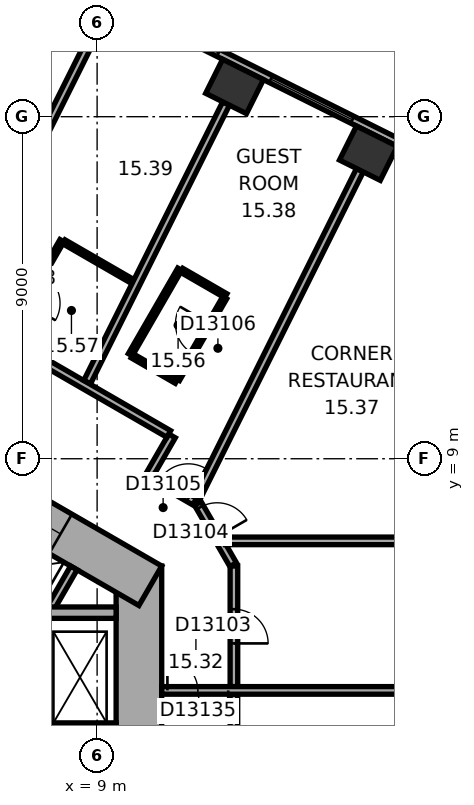
"""IFC4 building model, lengths in metres.
Left out: names, types, materials, properties, quantities, classifications, styles, units other than length and angle.
Written with IfcOpenShell. Run it as: python <this file> out.ifc"""

import sys

from ifc_helpers import new_model, si_unit, direction, frame, frame_2d, origin, origin_2d, place, context, subcontext, project, spatial, rectangle, extrude, element, fill, save


model = new_model("IFC4")
c1 = context("Model", 3, precision=1e-05, world=origin(), true_north=direction((0.0, 1.0)))
c2 = subcontext(c1, "Body", "Model", "MODEL_VIEW")
j1 = project(units=[si_unit("LENGTHUNIT", "METRE"), si_unit("PLANEANGLEUNIT", "RADIAN")], contexts=[c1])
p1 = place(None, origin())
s1 = spatial("IfcSite", under=j1, at=p1, CompositionType="ELEMENT")
p2 = place(p1, origin())
s2 = spatial("IfcBuilding", under=s1, at=p2, CompositionType="ELEMENT")
p3 = place(p2, frame((0.0, 0.0, 70.4)))
s3 = spatial("IfcBuildingStorey", under=s2, at=p3, CompositionType="ELEMENT", Elevation=70.4)
for number, where, z_axis, x_axis in (
    (1, (16.138, 17.04, 0.0), (0.0, 0.0, 1.0), (-0.895, 0.446, 0.0)),
    (2, (12.616, 18.795, 0.0), (0.0, 0.0, 1.0), (-0.895, 0.446, 0.0)),
):
    element("IfcColumn", number, at=place(p3, frame(where, z_axis=z_axis, x_axis=x_axis)), inside=s3, PredefinedType="COLUMN", context=c2, shape_type="SweptSolid", body=[
        extrude(rectangle(XDim=1.2, YDim=1.0, at=origin_2d()), origin(), (0.0, 0.0, 1.0), 3.3),
    ])
p4 = place(p3, frame((10.1, -6.177, 0.0), z_axis=(0.0, 0.0, 1.0), x_axis=(0.0, 1.0, 0.0)))
e3 = element("IfcWall", 3, at=p4, inside=s3, PredefinedType="SHEAR", context=c2, shape_type="SweptSolid", body=[
    extrude(rectangle(XDim=12.355, YDim=1.2, at=frame_2d((6.177, 0.0))), origin(), (0.0, 0.0, 1.0), 3.3),
])
p5 = place(p4, frame((6.378, 0.0, 0.0)))
e4 = element("IfcOpeningElement", 4, at=p5, cuts=e3, PredefinedType="OPENING", context=c2, shape_type="SweptSolid", body=[
    extrude(rectangle(XDim=1.5, YDim=2.1, at=frame_2d((0.75, 1.05))), frame((0.0, 0.61, 0.0), z_axis=(0.0, -1.0, 0.0), x_axis=(1.0, 0.0, 0.0)), (0.0, 0.0, 1.0), 1.22),
])
p6 = place(p4, frame((1.828, 0.0, 0.0)))
e5 = element("IfcOpeningElement", 5, at=p6, cuts=e3, PredefinedType="OPENING", context=c2, shape_type="SweptSolid", body=[
    extrude(rectangle(XDim=1.1, YDim=2.1, at=frame_2d((0.55, 1.05))), frame((0.0, 0.61, 0.0), z_axis=(0.0, -1.0, 0.0), x_axis=(1.0, 0.0, 0.0)), (0.0, 0.0, 1.0), 1.22),
])
p7 = place(p4, frame((4.427, 0.0, 0.0)))
e6 = element("IfcOpeningElement", 6, at=p7, cuts=e3, PredefinedType="OPENING", context=c2, shape_type="SweptSolid", body=[
    extrude(rectangle(XDim=1.1, YDim=2.1, at=frame_2d((0.55, 1.05))), frame((0.0, 0.61, 0.0), z_axis=(0.0, -1.0, 0.0), x_axis=(1.0, 0.0, 0.0)), (0.0, 0.0, 1.0), 1.22),
])
p8 = place(p3, frame((10.4, 5.658, 0.0), z_axis=(0.0, 0.0, 1.0), x_axis=(-0.866021384402, 0.500006961711, 0.0)))
e7 = element("IfcWall", 7, at=p8, inside=s3, PredefinedType="SHEAR", context=c2, shape_type="SweptSolid", body=[
    extrude(rectangle(XDim=12.355, YDim=1.2, at=frame_2d((6.178, 0.0))), origin(), (0.0, 0.0, 1.0), 3.3),
])
p9 = place(p8, frame((2.728, 0.0, 0.0)))
e8 = element("IfcOpeningElement", 8, at=p9, cuts=e7, PredefinedType="OPENING", context=c2, shape_type="SweptSolid", body=[
    extrude(rectangle(XDim=1.1, YDim=2.1, at=frame_2d((0.55, 1.05))), frame((0.0, 0.61, 0.0), z_axis=(0.0, -1.0, 0.0), x_axis=(1.0, 0.0, 0.0)), (0.0, 0.0, 1.0), 1.22),
])
p10 = place(p8, frame((5.328, 0.0, 0.0)))
e9 = element("IfcOpeningElement", 9, at=p10, cuts=e7, PredefinedType="OPENING", context=c2, shape_type="SweptSolid", body=[
    extrude(rectangle(XDim=1.1, YDim=2.1, at=frame_2d((0.55, 1.05))), frame((0.0, 0.61, 0.0), z_axis=(0.0, -1.0, 0.0), x_axis=(1.0, 0.0, 0.0)), (0.0, 0.0, 1.0), 1.22),
])
p11 = place(p8, frame((7.928, 0.0, 0.0)))
e10 = element("IfcOpeningElement", 10, at=p11, cuts=e7, PredefinedType="OPENING", context=c2, shape_type="SweptSolid", body=[
    extrude(rectangle(XDim=1.1, YDim=2.1, at=frame_2d((0.55, 1.05))), frame((0.0, 0.61, 0.0), z_axis=(0.0, -1.0, 0.0), x_axis=(1.0, 0.0, 0.0)), (0.0, 0.0, 1.0), 1.22),
])
p12 = place(p3, frame((20.63, 15.47, 0.0), z_axis=(0.0, 0.0, 1.0), x_axis=(-0.894934518609, 0.446197498203, 0.0)))
e11 = element("IfcWall", 11, at=p12, inside=s3, PredefinedType="STANDARD", context=c2, shape_type="SweptSolid", body=[
    extrude(rectangle(XDim=21.246, YDim=0.2, at=frame_2d((10.623, 0.0))), origin(), (0.0, 0.0, 1.0), 3.3),
])
p13 = place(p12, frame((1.553, 0.0, 0.8)))
e12 = element("IfcOpeningElement", 12, at=p13, cuts=e11, PredefinedType="OPENING", context=c2, shape_type="SweptSolid", body=[
    extrude(rectangle(XDim=2.4, YDim=1.7, at=frame_2d((1.2, 0.85))), frame((0.0, 0.11, 0.0), z_axis=(0.0, -1.0, 0.0), x_axis=(1.0, 0.0, 0.0)), (0.0, 0.0, 1.0), 0.22),
])
p14 = place(p12, frame((5.488, 0.0, 0.8)))
e13 = element("IfcOpeningElement", 13, at=p14, cuts=e11, PredefinedType="OPENING", context=c2, shape_type="SweptSolid", body=[
    extrude(rectangle(XDim=2.4, YDim=1.7, at=frame_2d((1.2, 0.85))), frame((0.0, 0.11, 0.0), z_axis=(0.0, -1.0, 0.0), x_axis=(1.0, 0.0, 0.0)), (0.0, 0.0, 1.0), 0.22),
])
p15 = place(p12, frame((9.422, 0.0, 0.8)))
e14 = element("IfcOpeningElement", 14, at=p15, cuts=e11, PredefinedType="OPENING", context=c2, shape_type="SweptSolid", body=[
    extrude(rectangle(XDim=2.4, YDim=1.7, at=frame_2d((1.2, 0.85))), frame((0.0, 0.11, 0.0), z_axis=(0.0, -1.0, 0.0), x_axis=(1.0, 0.0, 0.0)), (0.0, 0.0, 1.0), 0.22),
])
p16 = place(p12, frame((13.357, 0.0, 0.8)))
e15 = element("IfcOpeningElement", 15, at=p16, cuts=e11, PredefinedType="OPENING", context=c2, shape_type="SweptSolid", body=[
    extrude(rectangle(XDim=2.4, YDim=1.7, at=frame_2d((1.2, 0.85))), frame((0.0, 0.11, 0.0), z_axis=(0.0, -1.0, 0.0), x_axis=(1.0, 0.0, 0.0)), (0.0, 0.0, 1.0), 0.22),
])
p17 = place(p12, frame((17.292, 0.0, 0.8)))
e16 = element("IfcOpeningElement", 16, at=p17, cuts=e11, PredefinedType="OPENING", context=c2, shape_type="SweptSolid", body=[
    extrude(rectangle(XDim=2.4, YDim=1.7, at=frame_2d((1.2, 0.85))), frame((0.0, 0.11, 0.0), z_axis=(0.0, -1.0, 0.0), x_axis=(1.0, 0.0, 0.0)), (0.0, 0.0, 1.0), 0.22),
])
p18 = place(p3, frame((7.287, 4.222, 0.0), z_axis=(0.0, 0.0, 1.0), x_axis=(0.499946605688, 0.86605622881, 0.0)))
e17 = element("IfcWall", 17, at=p18, inside=s3, PredefinedType="PARTITIONING", context=c2, shape_type="SweptSolid", body=[
    extrude(rectangle(XDim=2.2, YDim=0.2, at=frame_2d((1.1, 0.0))), origin(), (0.0, 0.0, 1.0), 3.05),
])
p19 = place(p3, frame((7.3, 1.9, 0.0), z_axis=(0.0, 0.0, 1.0), x_axis=(1.0, 0.0, 0.0)))
e18 = element("IfcWall", 18, at=p19, inside=s3, PredefinedType="SHEAR", context=c2, shape_type="SweptSolid", body=[
    extrude(rectangle(XDim=2.2, YDim=0.3, at=frame_2d((1.1, 0.0))), origin(), (0.0, 0.0, 1.0), 3.05),
])
p20 = place(p19, frame((0.7, 0.0, 0.0)))
e19 = element("IfcOpeningElement", 19, at=p20, cuts=e18, PredefinedType="OPENING", context=c2, shape_type="SweptSolid", body=[
    extrude(rectangle(XDim=1.1, YDim=2.1, at=frame_2d((0.55, 1.05))), frame((0.0, 0.16, 0.0), z_axis=(0.0, -1.0, 0.0), x_axis=(1.0, 0.0, 0.0)), (0.0, 0.0, 1.0), 0.32),
])
p21 = place(p3, frame((7.3, 4.95, 0.0), z_axis=(0.0, 0.0, 1.0), x_axis=(1.0, 0.0, 0.0)))
e20 = element("IfcWall", 20, at=p21, inside=s3, PredefinedType="SHEAR", context=c2, shape_type="SweptSolid", body=[
    extrude(rectangle(XDim=2.2, YDim=0.3, at=frame_2d((1.1, 0.0))), origin(), (0.0, 0.0, 1.0), 3.05),
])
p22 = place(p3, frame((6.625, 12.227, 0.0), z_axis=(0.0, 0.0, 1.0), x_axis=(0.500023687443, 0.866011727401, 0.0)))
e21 = element("IfcWall", 21, at=p22, inside=s3, PredefinedType="PARTITIONING", context=c2, shape_type="SweptSolid", body=[
    extrude(rectangle(XDim=2.9, YDim=0.12, at=frame_2d((1.45, 0.0))), origin(), (0.0, 0.0, 1.0), 3.05),
])
p23 = place(p22, frame((1.0, 0.0, 0.0)))
e22 = element("IfcOpeningElement", 22, at=p23, cuts=e21, PredefinedType="OPENING", context=c2, shape_type="SweptSolid", body=[
    extrude(rectangle(XDim=0.9, YDim=2.1, at=frame_2d((0.45, 1.05))), frame((0.0, 0.07, 0.0), z_axis=(0.0, -1.0, 0.0), x_axis=(1.0, 0.0, 0.0)), (0.0, 0.0, 1.0), 0.14),
])
p24 = place(p3, frame((8.127, 14.708, 0.0), z_axis=(0.0, 0.0, 1.0), x_axis=(0.866065472234, -0.499930592986, 0.0)))
e23 = element("IfcWall", 23, at=p24, inside=s3, PredefinedType="PARTITIONING", context=c2, shape_type="SweptSolid", body=[
    extrude(rectangle(XDim=2.098, YDim=0.12, at=frame_2d((1.049, 0.0))), origin(), (0.0, 0.0, 1.0), 3.05),
])
p25 = place(p3, frame((8.872, 20.104, 0.0), z_axis=(0.0, 0.0, 1.0), x_axis=(-0.446218378653, -0.894924107706, 0.0)))
e24 = element("IfcWall", 24, at=p25, inside=s3, PredefinedType="PARTITIONING", context=c2, shape_type="SweptSolid", body=[
    extrude(rectangle(XDim=7.95, YDim=0.2, at=frame_2d((3.975, 0.0))), origin(), (0.0, 0.0, 1.0), 3.05),
])
p26 = place(p3, frame((9.875, 11.736, 0.0), z_axis=(0.0, 0.0, 1.0), x_axis=(0.499936506574, 0.866062058628, 0.0)))
e25 = element("IfcWall", 25, at=p26, inside=s3, PredefinedType="PARTITIONING", context=c2, shape_type="SweptSolid", body=[
    extrude(rectangle(XDim=2.6, YDim=0.12, at=frame_2d((1.3, 0.0))), origin(), (0.0, 0.0, 1.0), 3.05),
])
p27 = place(p3, frame((10.371, 8.561, 0.0), z_axis=(0.0, 0.0, 1.0), x_axis=(0.499986357472, 0.866033280158, 0.0)))
e26 = element("IfcWall", 26, at=p27, inside=s3, PredefinedType="PARTITIONING", context=c2, shape_type="SweptSolid", body=[
    extrude(rectangle(XDim=1.201, YDim=0.2, at=frame_2d((0.601, 0.0))), origin(), (0.0, 0.0, 1.0), 3.05),
])
p28 = place(p3, frame((10.885, 9.652, 0.0), z_axis=(0.0, 0.0, 1.0), x_axis=(-0.866033868542, 0.499985338323, 0.0)))
e27 = element("IfcWall", 27, at=p28, inside=s3, PredefinedType="PARTITIONING", context=c2, shape_type="SweptSolid", body=[
    extrude(rectangle(XDim=8.602, YDim=0.2, at=frame_2d((4.301, 0.0))), origin(), (0.0, 0.0, 1.0), 3.05),
])
p29 = place(p28, frame((5.302, 0.0, 0.0)))
e28 = element("IfcOpeningElement", 28, at=p29, cuts=e27, PredefinedType="OPENING", context=c2, shape_type="SweptSolid", body=[
    extrude(rectangle(XDim=0.9, YDim=2.1, at=frame_2d((0.45, 1.05))), frame((0.0, 0.11, 0.0), z_axis=(0.0, -1.0, 0.0), x_axis=(1.0, 0.0, 0.0)), (0.0, 0.0, 1.0), 0.22),
])
for number, where, z_axis, x_axis in (
    (29, (11.087, 11.036, 0.0), (0.0, 0.0, 1.0), (-0.866, 0.5, 0.0)),
    (30, (11.226, 13.958, 0.0), (0.0, 0.0, 1.0), (0.866, -0.5, 0.0)),
):
    element("IfcWall", number, at=place(p3, frame(where, z_axis=z_axis, x_axis=x_axis)), inside=s3, PredefinedType="PARTITIONING", context=c2, shape_type="SweptSolid", body=[
        extrude(rectangle(XDim=1.34, YDim=0.12, at=frame_2d((0.67, 0.0))), origin(), (0.0, 0.0, 1.0), 3.05),
    ])
p30 = place(p3, frame((11.566, 7.871, 0.0), z_axis=(0.0, 0.0, 1.0), x_axis=(-0.866004557827, 0.500036104519, 0.0)))
e31 = element("IfcWall", 31, at=p30, inside=s3, PredefinedType="PARTITIONING", context=c2, shape_type="SweptSolid", body=[
    extrude(rectangle(XDim=1.28, YDim=0.2, at=frame_2d((0.64, 0.0))), origin(), (0.0, 0.0, 1.0), 3.05),
])
p31 = place(p30, frame((0.19, 0.0, 0.0)))
e32 = element("IfcOpeningElement", 32, at=p31, cuts=e31, PredefinedType="OPENING", context=c2, shape_type="SweptSolid", body=[
    extrude(rectangle(XDim=0.9, YDim=2.1, at=frame_2d((0.45, 1.05))), frame((0.0, 0.11, 0.0), z_axis=(0.0, -1.0, 0.0), x_axis=(1.0, 0.0, 0.0)), (0.0, 0.0, 1.0), 0.22),
])
p32 = place(p3, frame((12.357, 13.236, 0.0), z_axis=(0.0, 0.0, 1.0), x_axis=(-0.50000366821, -0.866023285932, 0.0)))
e33 = element("IfcWall", 33, at=p32, inside=s3, PredefinedType="PARTITIONING", context=c2, shape_type="SweptSolid", body=[
    extrude(rectangle(XDim=2.48, YDim=0.12, at=frame_2d((1.24, 0.0))), origin(), (0.0, 0.0, 1.0), 3.05),
])
p33 = place(p32, frame((0.79, 0.0, 0.0)))
e34 = element("IfcOpeningElement", 34, at=p33, cuts=e33, PredefinedType="OPENING", context=c2, shape_type="SweptSolid", body=[
    extrude(rectangle(XDim=0.9, YDim=2.1, at=frame_2d((0.45, 1.05))), frame((0.0, 0.07, 0.0), z_axis=(0.0, -1.0, 0.0), x_axis=(1.0, 0.0, 0.0)), (0.0, 0.0, 1.0), 0.14),
])
p34 = place(p3, frame((12.393, 18.348, 0.0), z_axis=(0.0, 0.0, 1.0), x_axis=(-0.446176022699, -0.894945225569, 0.0)))
e35 = element("IfcWall", 35, at=p34, inside=s3, PredefinedType="PARTITIONING", context=c2, shape_type="SweptSolid", body=[
    extrude(rectangle(XDim=8.191, YDim=0.2, at=frame_2d((4.095, 0.0))), origin(), (0.0, 0.0, 1.0), 2.6),
])
p35 = place(p3, frame((12.58, 6.212, 0.0), z_axis=(0.0, 0.0, 1.0), x_axis=(-0.500063286585, 0.865988862174, 0.0)))
e36 = element("IfcWall", 36, at=p35, inside=s3, PredefinedType="PARTITIONING", context=c2, shape_type="SweptSolid", body=[
    extrude(rectangle(XDim=1.86, YDim=0.2, at=frame_2d((0.93, 0.0))), origin(), (0.0, 0.0, 1.0), 3.05),
])
p36 = place(p35, frame((0.842, 0.0, 0.0)))
e37 = element("IfcOpeningElement", 37, at=p36, cuts=e36, PredefinedType="OPENING", context=c2, shape_type="SweptSolid", body=[
    extrude(rectangle(XDim=0.9, YDim=2.1, at=frame_2d((0.45, 1.05))), frame((0.0, 0.11, 0.0), z_axis=(0.0, -1.0, 0.0), x_axis=(1.0, 0.0, 0.0)), (0.0, 0.0, 1.0), 0.22),
])
p37 = place(p3, frame((12.6, 0.201, 0.0), z_axis=(0.0, 0.0, 1.0), x_axis=(0.0, 1.0, 0.0)))
e38 = element("IfcWall", 38, at=p37, inside=s3, PredefinedType="PARTITIONING", context=c2, shape_type="SweptSolid", body=[
    extrude(rectangle(XDim=2.604, YDim=0.2, at=frame_2d((1.302, 0.0))), origin(), (0.0, 0.0, 1.0), 3.05),
])
p38 = place(p37, frame((0.852, 0.0, 0.0)))
e39 = element("IfcOpeningElement", 39, at=p38, cuts=e38, PredefinedType="OPENING", context=c2, shape_type="SweptSolid", body=[
    extrude(rectangle(XDim=0.9, YDim=2.1, at=frame_2d((0.45, 1.05))), frame((0.0, 0.11, 0.0), z_axis=(0.0, -1.0, 0.0), x_axis=(1.0, 0.0, 0.0)), (0.0, 0.0, 1.0), 0.22),
])
p39 = place(p3, frame((12.6, 3.004, 0.0), z_axis=(0.0, 0.0, 1.0), x_axis=(0.0, 1.0, 0.0)))
e40 = element("IfcWall", 40, at=p39, inside=s3, PredefinedType="PARTITIONING", context=c2, shape_type="SweptSolid", body=[
    extrude(rectangle(XDim=3.173, YDim=0.2, at=frame_2d((1.586, 0.0))), origin(), (0.0, 0.0, 1.0), 3.05),
])
p40 = place(p39, frame((1.136, 0.0, 0.0)))
e41 = element("IfcOpeningElement", 41, at=p40, cuts=e40, PredefinedType="OPENING", context=c2, shape_type="SweptSolid", body=[
    extrude(rectangle(XDim=0.9, YDim=2.1, at=frame_2d((0.45, 1.05))), frame((0.0, 0.11, 0.0), z_axis=(0.0, -1.0, 0.0), x_axis=(1.0, 0.0, 0.0)), (0.0, 0.0, 1.0), 0.22),
])
p41 = place(p3, frame((15.915, 16.592, 0.0), z_axis=(0.0, 0.0, 1.0), x_axis=(-0.446199736347, -0.894933402709, 0.0)))
e42 = element("IfcWall", 42, at=p41, inside=s3, PredefinedType="PARTITIONING", context=c2, shape_type="SweptSolid", body=[
    extrude(rectangle(XDim=9.635, YDim=0.2, at=frame_2d((4.817, 0.0))), origin(), (0.0, 0.0, 1.0), 3.05),
])
p42 = place(p3, frame((21.95, 2.905, 0.0), z_axis=(0.0, 0.0, 1.0), x_axis=(-1.0, 0.0, 0.0)))
e43 = element("IfcWall", 43, at=p42, inside=s3, PredefinedType="PARTITIONING", context=c2, shape_type="SweptSolid", body=[
    extrude(rectangle(XDim=11.25, YDim=0.2, at=frame_2d((5.625, 0.0))), origin(), (0.0, 0.0, 1.0), 3.05),
])
p43 = place(p42, frame((9.5, 0.0, 0.0)))
e44 = element("IfcOpeningElement", 44, at=p43, cuts=e43, PredefinedType="OPENING", context=c2, shape_type="SweptSolid", body=[
    extrude(rectangle(XDim=1.6, YDim=2.1, at=frame_2d((0.8, 1.05))), frame((0.0, 0.11, 0.0), z_axis=(0.0, -1.0, 0.0), x_axis=(1.0, 0.0, 0.0)), (0.0, 0.0, 1.0), 0.22),
])
p44 = place(p3, frame((21.95, 6.839, 0.0), z_axis=(0.0, 0.0, 1.0), x_axis=(-1.0, 0.0, 0.0)))
e45 = element("IfcWall", 45, at=p44, inside=s3, PredefinedType="PARTITIONING", context=c2, shape_type="SweptSolid", body=[
    extrude(rectangle(XDim=9.572, YDim=0.2, at=frame_2d((4.786, 0.0))), origin(), (0.0, 0.0, 1.0), 3.05),
])
p45 = place(p14, origin())
e46 = element("IfcWindow", 46, at=p45, inside=s3, PartitioningType="SINGLE_PANEL", PredefinedType="WINDOW", context=c2, shape_type="SweptSolid", body=[
    extrude(rectangle(XDim=2.4, YDim=1.7, at=frame_2d((1.2, 0.85))), frame((0.0, 0.03, 0.0), z_axis=(0.0, -1.0, 0.0), x_axis=(1.0, 0.0, 0.0)), (0.0, 0.0, 1.0), 0.06),
])
fill(e13, e46)
p46 = place(p15, origin())
e47 = element("IfcWindow", 47, at=p46, inside=s3, PartitioningType="SINGLE_PANEL", PredefinedType="WINDOW", context=c2, shape_type="SweptSolid", body=[
    extrude(rectangle(XDim=2.4, YDim=1.7, at=frame_2d((1.2, 0.85))), frame((0.0, 0.03, 0.0), z_axis=(0.0, -1.0, 0.0), x_axis=(1.0, 0.0, 0.0)), (0.0, 0.0, 1.0), 0.06),
])
fill(e14, e47)
p47 = place(p9, origin())
e48 = element("IfcDoor", 48, at=p47, inside=s3, OperationType="DOUBLE_DOOR_SLIDING", PredefinedType="DOOR", context=c2, shape_type="SweptSolid", body=[
    extrude(rectangle(XDim=1.1, YDim=2.1, at=frame_2d((0.55, 1.05))), frame((0.0, 0.025, 0.0), z_axis=(0.0, -1.0, 0.0), x_axis=(1.0, 0.0, 0.0)), (0.0, 0.0, 1.0), 0.05),
])
fill(e8, e48)
p48 = place(p40, origin())
e49 = element("IfcDoor", 49, at=p48, inside=s3, OperationType="SINGLE_SWING_LEFT", PredefinedType="DOOR", context=c2, shape_type="SweptSolid", body=[
    extrude(rectangle(XDim=0.9, YDim=2.1, at=frame_2d((0.45, 1.05))), frame((0.0, 0.025, 0.0), z_axis=(0.0, -1.0, 0.0), x_axis=(1.0, 0.0, 0.0)), (0.0, 0.0, 1.0), 0.05),
])
fill(e41, e49)
p49 = place(p36, origin())
e50 = element("IfcDoor", 50, at=p49, inside=s3, OperationType="SINGLE_SWING_LEFT", PredefinedType="DOOR", context=c2, shape_type="SweptSolid", body=[
    extrude(rectangle(XDim=0.9, YDim=2.1, at=frame_2d((0.45, 1.05))), frame((0.0, 0.025, 0.0), z_axis=(0.0, -1.0, 0.0), x_axis=(1.0, 0.0, 0.0)), (0.0, 0.0, 1.0), 0.05),
])
fill(e37, e50)
p50 = place(p31, origin())
e51 = element("IfcDoor", 51, at=p50, inside=s3, OperationType="SINGLE_SWING_LEFT", PredefinedType="DOOR", context=c2, shape_type="SweptSolid", body=[
    extrude(rectangle(XDim=0.9, YDim=2.1, at=frame_2d((0.45, 1.05))), frame((0.0, 0.025, 0.0), z_axis=(0.0, -1.0, 0.0), x_axis=(1.0, 0.0, 0.0)), (0.0, 0.0, 1.0), 0.05),
])
fill(e32, e51)
p51 = place(p33, origin())
e52 = element("IfcDoor", 52, at=p51, inside=s3, OperationType="SINGLE_SWING_LEFT", PredefinedType="DOOR", context=c2, shape_type="SweptSolid", body=[
    extrude(rectangle(XDim=0.9, YDim=2.1, at=frame_2d((0.45, 1.05))), frame((0.0, 0.025, 0.0), z_axis=(0.0, -1.0, 0.0), x_axis=(1.0, 0.0, 0.0)), (0.0, 0.0, 1.0), 0.05),
])
fill(e34, e52)
p52 = place(p43, origin())
e53 = element("IfcDoor", 53, at=p52, inside=s3, OperationType="DOUBLE_DOOR_SINGLE_SWING", PredefinedType="DOOR", context=c2, shape_type="SweptSolid", body=[
    extrude(rectangle(XDim=1.6, YDim=2.1, at=frame_2d((0.8, 1.05))), frame((0.0, 0.025, 0.0), z_axis=(0.0, -1.0, 0.0), x_axis=(1.0, 0.0, 0.0)), (0.0, 0.0, 1.0), 0.05),
])
fill(e44, e53)
save(model, sys.argv[1])
